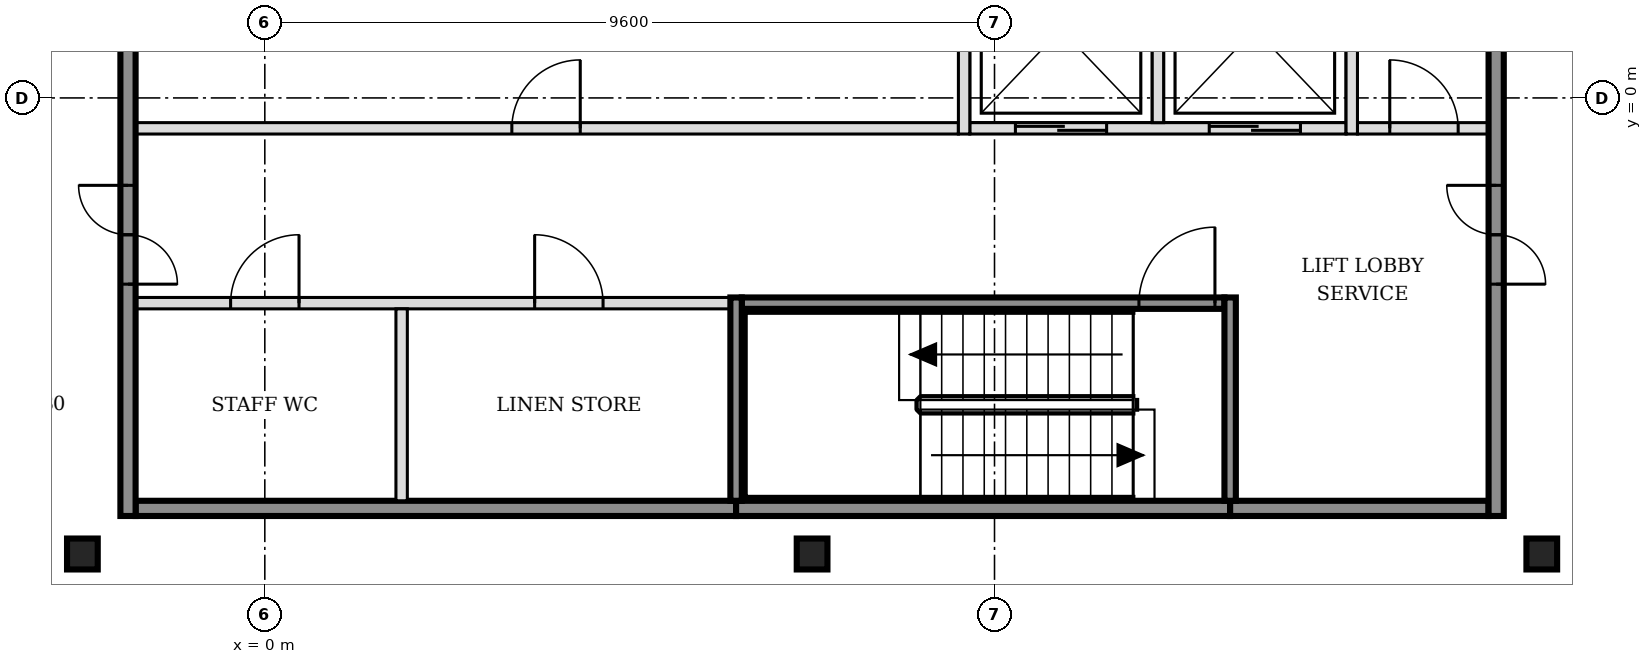
"""IFC4 building model, lengths in metres.
Left out: names, types, materials, properties, quantities, classifications, styles, units other than length and angle.
Written with IfcOpenShell. Run it as: python <this file> out.ifc"""

import sys

from ifc_helpers import new_model, si_unit, direction, frame, frame_2d, origin, origin_2d, place, context, subcontext, project, spatial, rectangle, i_section, extrude, element, fill, save


model = new_model("IFC4")
c1 = context("Model", 3, precision=1e-05, world=origin(), true_north=direction((0.0, 1.0)))
c2 = subcontext(c1, "Body", "Model", "MODEL_VIEW")
j1 = project(units=[si_unit("LENGTHUNIT", "METRE"), si_unit("PLANEANGLEUNIT", "RADIAN")], contexts=[c1])
p1 = place(None, origin())
s1 = spatial("IfcSite", under=j1, at=p1, CompositionType="ELEMENT")
p2 = place(p1, origin())
s2 = spatial("IfcBuilding", under=s1, at=p2, CompositionType="ELEMENT")
p3 = place(p2, frame((0.0, 0.0, 217.8)))
s3 = spatial("IfcBuildingStorey", under=s2, at=p3, CompositionType="ELEMENT", Elevation=217.8)
for number, where, z_axis, x_axis in (
    (1, (-2.4, -6.0, -0.15), (0.0, 0.0, 1.0), (1.0, 0.0, 0.0)),
    (2, (7.2, -6.0, -0.15), (0.0, 0.0, 1.0), (1.0, 0.0, 0.0)),
    (3, (16.8, -6.0, -0.15), (0.0, 0.0, 1.0), (1.0, 0.0, 0.0)),
):
    element("IfcColumn", number, at=place(p3, frame(where, z_axis=z_axis, x_axis=x_axis)), inside=s3, PredefinedType="COLUMN", context=c2, shape_type="SweptSolid", body=[
        extrude(i_section(OverallWidth=0.404, OverallDepth=0.407, WebThickness=0.027, FlangeThickness=0.044, FilletRadius=0.015, at=origin_2d()), origin(), (0.0, 0.0, 1.0), 3.6),
    ])
p4 = place(p3, frame((-1.7, -5.4, 0.0), z_axis=(0.0, 0.0, 1.0), x_axis=(1.0, 0.0, 0.0)))
e4 = element("IfcWall", 4, at=p4, inside=s3, PredefinedType="SOLIDWALL", context=c2, shape_type="SweptSolid", body=[
    extrude(rectangle(XDim=7.9, YDim=0.2, at=frame_2d((3.95, 0.0))), origin(), (0.0, 0.0, 1.0), 3.45),
])
p5 = place(p3, frame((6.2, -5.4, 0.0), z_axis=(0.0, 0.0, 1.0), x_axis=(1.0, 0.0, 0.0)))
e5 = element("IfcWall", 5, at=p5, inside=s3, PredefinedType="SOLIDWALL", context=c2, shape_type="SweptSolid", body=[
    extrude(rectangle(XDim=6.5, YDim=0.2, at=frame_2d((3.25, 0.0))), origin(), (0.0, 0.0, 1.0), 3.45),
])
p6 = place(p3, frame((12.7, -5.4, 0.0), z_axis=(0.0, 0.0, 1.0), x_axis=(1.0, 0.0, 0.0)))
e6 = element("IfcWall", 6, at=p6, inside=s3, PredefinedType="SOLIDWALL", context=c2, shape_type="SweptSolid", body=[
    extrude(rectangle(XDim=3.4, YDim=0.2, at=frame_2d((1.7, 0.0))), origin(), (0.0, 0.0, 1.0), 3.45),
])
p7 = place(p3, frame((-1.7, -2.7, 0.0), z_axis=(0.0, 0.0, 1.0), x_axis=(1.0, 0.0, 0.0)))
e7 = element("IfcWall", 7, at=p7, inside=s3, PredefinedType="PARTITIONING", context=c2, shape_type="SweptSolid", body=[
    extrude(rectangle(XDim=7.825, YDim=0.15, at=frame_2d((3.913, 0.0))), origin(), (0.0, 0.0, 1.0), 3.45),
])
p8 = place(p7, frame((1.25, 0.0, 0.0)))
e8 = element("IfcOpeningElement", 8, at=p8, cuts=e7, PredefinedType="OPENING", context=c2, shape_type="SweptSolid", body=[
    extrude(rectangle(XDim=0.9, YDim=2.1, at=frame_2d((0.45, 1.05))), frame((0.0, 0.085, 0.0), z_axis=(0.0, -1.0, 0.0), x_axis=(1.0, 0.0, 0.0)), (0.0, 0.0, 1.0), 0.17),
])
p9 = place(p7, frame((5.25, 0.0, 0.0)))
e9 = element("IfcOpeningElement", 9, at=p9, cuts=e7, PredefinedType="OPENING", context=c2, shape_type="SweptSolid", body=[
    extrude(rectangle(XDim=0.9, YDim=2.1, at=frame_2d((0.45, 1.05))), frame((0.0, 0.085, 0.0), z_axis=(0.0, -1.0, 0.0), x_axis=(1.0, 0.0, 0.0)), (0.0, 0.0, 1.0), 0.17),
])
p10 = place(p3, frame((6.275, -2.7, 0.0), z_axis=(0.0, 0.0, 1.0), x_axis=(1.0, 0.0, 0.0)))
e10 = element("IfcWall", 10, at=p10, inside=s3, PredefinedType="SOLIDWALL", context=c2, shape_type="SweptSolid", body=[
    extrude(rectangle(XDim=6.35, YDim=0.15, at=frame_2d((3.175, 0.0))), origin(), (0.0, 0.0, 1.0), 3.45),
])
p11 = place(p10, frame((5.225, 0.0, 0.0)))
e11 = element("IfcOpeningElement", 11, at=p11, cuts=e10, PredefinedType="OPENING", context=c2, shape_type="SweptSolid", body=[
    extrude(rectangle(XDim=1.0, YDim=2.1, at=frame_2d((0.5, 1.05))), frame((0.0, 0.085, 0.0), z_axis=(0.0, -1.0, 0.0), x_axis=(1.0, 0.0, 0.0)), (0.0, 0.0, 1.0), 0.17),
])
p12 = place(p3, frame((-1.7, -0.4, 0.0), z_axis=(0.0, 0.0, 1.0), x_axis=(1.0, 0.0, 0.0)))
e12 = element("IfcWall", 12, at=p12, inside=s3, PredefinedType="PARTITIONING", context=c2, shape_type="SweptSolid", body=[
    extrude(rectangle(XDim=10.825, YDim=0.15, at=frame_2d((5.413, 0.0))), origin(), (0.0, 0.0, 1.0), 3.45),
])
p13 = place(p12, frame((4.95, 0.0, 0.0)))
e13 = element("IfcOpeningElement", 13, at=p13, cuts=e12, PredefinedType="OPENING", context=c2, shape_type="SweptSolid", body=[
    extrude(rectangle(XDim=0.9, YDim=2.1, at=frame_2d((0.45, 1.05))), frame((0.0, 0.085, 0.0), z_axis=(0.0, -1.0, 0.0), x_axis=(1.0, 0.0, 0.0)), (0.0, 0.0, 1.0), 0.17),
])
p14 = place(p3, frame((9.275, -0.4, 0.0), z_axis=(0.0, 0.0, 1.0), x_axis=(1.0, 0.0, 0.0)))
e14 = element("IfcWall", 14, at=p14, inside=s3, PredefinedType="SOLIDWALL", context=c2, shape_type="SweptSolid", body=[
    extrude(rectangle(XDim=4.95, YDim=0.15, at=frame_2d((2.475, 0.0))), origin(), (0.0, 0.0, 1.0), 3.45),
])
p15 = place(p14, frame((0.6, 0.0, 0.0)))
e15 = element("IfcOpeningElement", 15, at=p15, cuts=e14, PredefinedType="OPENING", context=c2, shape_type="SweptSolid", body=[
    extrude(rectangle(XDim=1.2, YDim=2.1, at=frame_2d((0.6, 1.05))), frame((0.0, 0.085, 0.0), z_axis=(0.0, -1.0, 0.0), x_axis=(1.0, 0.0, 0.0)), (0.0, 0.0, 1.0), 0.17),
])
p16 = place(p14, frame((3.15, 0.0, 0.0)))
e16 = element("IfcOpeningElement", 16, at=p16, cuts=e14, PredefinedType="OPENING", context=c2, shape_type="SweptSolid", body=[
    extrude(rectangle(XDim=1.2, YDim=2.1, at=frame_2d((0.6, 1.05))), frame((0.0, 0.085, 0.0), z_axis=(0.0, -1.0, 0.0), x_axis=(1.0, 0.0, 0.0)), (0.0, 0.0, 1.0), 0.17),
])
p17 = place(p3, frame((14.375, -0.4, 0.0), z_axis=(0.0, 0.0, 1.0), x_axis=(1.0, 0.0, 0.0)))
e17 = element("IfcWall", 17, at=p17, inside=s3, PredefinedType="PARTITIONING", context=c2, shape_type="SweptSolid", body=[
    extrude(rectangle(XDim=1.725, YDim=0.15, at=frame_2d((0.863, 0.0))), origin(), (0.0, 0.0, 1.0), 3.45),
])
p18 = place(p17, frame((0.425, 0.0, 0.0)))
e18 = element("IfcOpeningElement", 18, at=p18, cuts=e17, PredefinedType="OPENING", context=c2, shape_type="SweptSolid", body=[
    extrude(rectangle(XDim=0.9, YDim=2.1, at=frame_2d((0.45, 1.05))), frame((0.0, 0.085, 0.0), z_axis=(0.0, -1.0, 0.0), x_axis=(1.0, 0.0, 0.0)), (0.0, 0.0, 1.0), 0.17),
])
p19 = place(p3, frame((-1.8, -5.5, 0.0), z_axis=(0.0, 0.0, 1.0), x_axis=(0.0, 1.0, 0.0)))
e19 = element("IfcWall", 19, at=p19, inside=s3, PredefinedType="SOLIDWALL", context=c2, shape_type="SweptSolid", body=[
    extrude(rectangle(XDim=15.8, YDim=0.2, at=frame_2d((7.9, 0.0))), origin(), (0.0, 0.0, 1.0), 3.45),
])
p20 = place(p19, frame((3.05, 0.0, 0.0)))
e20 = element("IfcOpeningElement", 20, at=p20, cuts=e19, PredefinedType="OPENING", context=c2, shape_type="SweptSolid", body=[
    extrude(rectangle(XDim=1.3, YDim=2.1, at=frame_2d((0.65, 1.05))), frame((0.0, 0.11, 0.0), z_axis=(0.0, -1.0, 0.0), x_axis=(1.0, 0.0, 0.0)), (0.0, 0.0, 1.0), 0.22),
])
p21 = place(p19, frame((11.45, 0.0, 0.0)))
e21 = element("IfcOpeningElement", 21, at=p21, cuts=e19, PredefinedType="OPENING", context=c2, shape_type="SweptSolid", body=[
    extrude(rectangle(XDim=1.3, YDim=2.1, at=frame_2d((0.65, 1.05))), frame((0.0, 0.11, 0.0), z_axis=(0.0, -1.0, 0.0), x_axis=(1.0, 0.0, 0.0)), (0.0, 0.0, 1.0), 0.22),
])
p22 = place(p3, frame((1.8, -5.3, 0.0), z_axis=(0.0, 0.0, 1.0), x_axis=(0.0, 1.0, 0.0)))
e22 = element("IfcWall", 22, at=p22, inside=s3, PredefinedType="PARTITIONING", context=c2, shape_type="SweptSolid", body=[
    extrude(rectangle(XDim=2.525, YDim=0.15, at=frame_2d((1.263, 0.0))), origin(), (0.0, 0.0, 1.0), 3.45),
])
p23 = place(p3, frame((6.2, -5.3, 0.0), z_axis=(0.0, 0.0, 1.0), x_axis=(0.0, 1.0, 0.0)))
e23 = element("IfcWall", 23, at=p23, inside=s3, PredefinedType="SOLIDWALL", context=c2, shape_type="SweptSolid", body=[
    extrude(rectangle(XDim=2.675, YDim=0.15, at=frame_2d((1.337, 0.0))), origin(), (0.0, 0.0, 1.0), 3.45),
])
p24 = place(p3, frame((9.2, -0.475, 0.0), z_axis=(0.0, 0.0, 1.0), x_axis=(0.0, 1.0, 0.0)))
e24 = element("IfcWall", 24, at=p24, inside=s3, PredefinedType="SOLIDWALL", context=c2, shape_type="SweptSolid", body=[
    extrude(rectangle(XDim=2.6, YDim=0.15, at=frame_2d((1.3, 0.0))), origin(), (0.0, 0.0, 1.0), 3.45),
])
p25 = place(p3, frame((11.75, -0.325, 0.0), z_axis=(0.0, 0.0, 1.0), x_axis=(0.0, 1.0, 0.0)))
e25 = element("IfcWall", 25, at=p25, inside=s3, PredefinedType="SOLIDWALL", context=c2, shape_type="SweptSolid", body=[
    extrude(rectangle(XDim=2.45, YDim=0.15, at=frame_2d((1.225, 0.0))), origin(), (0.0, 0.0, 1.0), 3.45),
])
p26 = place(p3, frame((12.7, -5.3, 0.0), z_axis=(0.0, 0.0, 1.0), x_axis=(0.0, 1.0, 0.0)))
e26 = element("IfcWall", 26, at=p26, inside=s3, PredefinedType="SOLIDWALL", context=c2, shape_type="SweptSolid", body=[
    extrude(rectangle(XDim=2.675, YDim=0.15, at=frame_2d((1.337, 0.0))), origin(), (0.0, 0.0, 1.0), 3.45),
])
p27 = place(p3, frame((14.3, -0.475, 0.0), z_axis=(0.0, 0.0, 1.0), x_axis=(0.0, 1.0, 0.0)))
e27 = element("IfcWall", 27, at=p27, inside=s3, PredefinedType="SOLIDWALL", context=c2, shape_type="SweptSolid", body=[
    extrude(rectangle(XDim=2.75, YDim=0.15, at=frame_2d((1.375, 0.0))), origin(), (0.0, 0.0, 1.0), 3.45),
])
p28 = place(p3, frame((16.2, -5.5, 0.0), z_axis=(0.0, 0.0, 1.0), x_axis=(0.0, 1.0, 0.0)))
e28 = element("IfcWall", 28, at=p28, inside=s3, PredefinedType="SOLIDWALL", context=c2, shape_type="SweptSolid", body=[
    extrude(rectangle(XDim=15.8, YDim=0.2, at=frame_2d((7.9, 0.0))), origin(), (0.0, 0.0, 1.0), 3.45),
])
p29 = place(p28, frame((3.05, 0.0, 0.0)))
e29 = element("IfcOpeningElement", 29, at=p29, cuts=e28, PredefinedType="OPENING", context=c2, shape_type="SweptSolid", body=[
    extrude(rectangle(XDim=1.3, YDim=2.1, at=frame_2d((0.65, 1.05))), frame((0.0, 0.11, 0.0), z_axis=(0.0, -1.0, 0.0), x_axis=(1.0, 0.0, 0.0)), (0.0, 0.0, 1.0), 0.22),
])
p30 = place(p28, frame((11.45, 0.0, 0.0)))
e30 = element("IfcOpeningElement", 30, at=p30, cuts=e28, PredefinedType="OPENING", context=c2, shape_type="SweptSolid", body=[
    extrude(rectangle(XDim=1.3, YDim=2.1, at=frame_2d((0.65, 1.05))), frame((0.0, 0.11, 0.0), z_axis=(0.0, -1.0, 0.0), x_axis=(1.0, 0.0, 0.0)), (0.0, 0.0, 1.0), 0.22),
])
p31 = place(p15, origin())
e31 = element("IfcDoor", 31, at=p31, inside=s3, OperationType="DOUBLE_DOOR_SLIDING", PredefinedType="DOOR", context=c2, shape_type="SweptSolid", body=[
    extrude(rectangle(XDim=1.2, YDim=2.1, at=frame_2d((0.6, 1.05))), frame((0.0, 0.025, 0.0), z_axis=(0.0, -1.0, 0.0), x_axis=(1.0, 0.0, 0.0)), (0.0, 0.0, 1.0), 0.05),
])
fill(e15, e31)
p32 = place(p16, origin())
e32 = element("IfcDoor", 32, at=p32, inside=s3, OperationType="DOUBLE_DOOR_SLIDING", PredefinedType="DOOR", context=c2, shape_type="SweptSolid", body=[
    extrude(rectangle(XDim=1.2, YDim=2.1, at=frame_2d((0.6, 1.05))), frame((0.0, 0.025, 0.0), z_axis=(0.0, -1.0, 0.0), x_axis=(1.0, 0.0, 0.0)), (0.0, 0.0, 1.0), 0.05),
])
fill(e16, e32)
p33 = place(p11, origin())
e33 = element("IfcDoor", 33, at=p33, inside=s3, OperationType="SINGLE_SWING_RIGHT", PredefinedType="DOOR", context=c2, shape_type="SweptSolid", body=[
    extrude(rectangle(XDim=1.0, YDim=2.1, at=frame_2d((0.5, 1.05))), frame((0.0, 0.025, 0.0), z_axis=(0.0, -1.0, 0.0), x_axis=(1.0, 0.0, 0.0)), (0.0, 0.0, 1.0), 0.05),
])
fill(e11, e33)
p34 = place(p20, origin())
e34 = element("IfcDoor", 34, at=p34, inside=s3, OperationType="DOUBLE_DOOR_SINGLE_SWING", PredefinedType="DOOR", context=c2, shape_type="SweptSolid", body=[
    extrude(rectangle(XDim=1.3, YDim=2.1, at=frame_2d((0.65, 1.05))), frame((0.0, 0.025, 0.0), z_axis=(0.0, -1.0, 0.0), x_axis=(1.0, 0.0, 0.0)), (0.0, 0.0, 1.0), 0.05),
])
fill(e20, e34)
p35 = place(p29, origin())
e35 = element("IfcDoor", 35, at=p35, inside=s3, OperationType="DOUBLE_DOOR_SINGLE_SWING", PredefinedType="DOOR", context=c2, shape_type="SweptSolid", body=[
    extrude(rectangle(XDim=1.3, YDim=2.1, at=frame_2d((0.65, 1.05))), frame((0.0, 0.025, 0.0), z_axis=(0.0, -1.0, 0.0), x_axis=(1.0, 0.0, 0.0)), (0.0, 0.0, 1.0), 0.05),
])
fill(e29, e35)
p36 = place(p18, origin())
e36 = element("IfcDoor", 36, at=p36, inside=s3, OperationType="SINGLE_SWING_LEFT", PredefinedType="DOOR", context=c2, shape_type="SweptSolid", body=[
    extrude(rectangle(XDim=0.9, YDim=2.1, at=frame_2d((0.45, 1.05))), frame((0.0, 0.025, 0.0), z_axis=(0.0, -1.0, 0.0), x_axis=(1.0, 0.0, 0.0)), (0.0, 0.0, 1.0), 0.05),
])
fill(e18, e36)
p37 = place(p8, origin())
e37 = element("IfcDoor", 37, at=p37, inside=s3, OperationType="SINGLE_SWING_RIGHT", PredefinedType="DOOR", context=c2, shape_type="SweptSolid", body=[
    extrude(rectangle(XDim=0.9, YDim=2.1, at=frame_2d((0.45, 1.05))), frame((0.0, 0.025, 0.0), z_axis=(0.0, -1.0, 0.0), x_axis=(1.0, 0.0, 0.0)), (0.0, 0.0, 1.0), 0.05),
])
fill(e8, e37)
p38 = place(p9, origin())
e38 = element("IfcDoor", 38, at=p38, inside=s3, OperationType="SINGLE_SWING_LEFT", PredefinedType="DOOR", context=c2, shape_type="SweptSolid", body=[
    extrude(rectangle(XDim=0.9, YDim=2.1, at=frame_2d((0.45, 1.05))), frame((0.0, 0.025, 0.0), z_axis=(0.0, -1.0, 0.0), x_axis=(1.0, 0.0, 0.0)), (0.0, 0.0, 1.0), 0.05),
])
fill(e9, e38)
p39 = place(p13, origin())
e39 = element("IfcDoor", 39, at=p39, inside=s3, OperationType="SINGLE_SWING_RIGHT", PredefinedType="DOOR", context=c2, shape_type="SweptSolid", body=[
    extrude(rectangle(XDim=0.9, YDim=2.1, at=frame_2d((0.45, 1.05))), frame((0.0, 0.025, 0.0), z_axis=(0.0, -1.0, 0.0), x_axis=(1.0, 0.0, 0.0)), (0.0, 0.0, 1.0), 0.05),
])
fill(e13, e39)
save(model, sys.argv[1])
